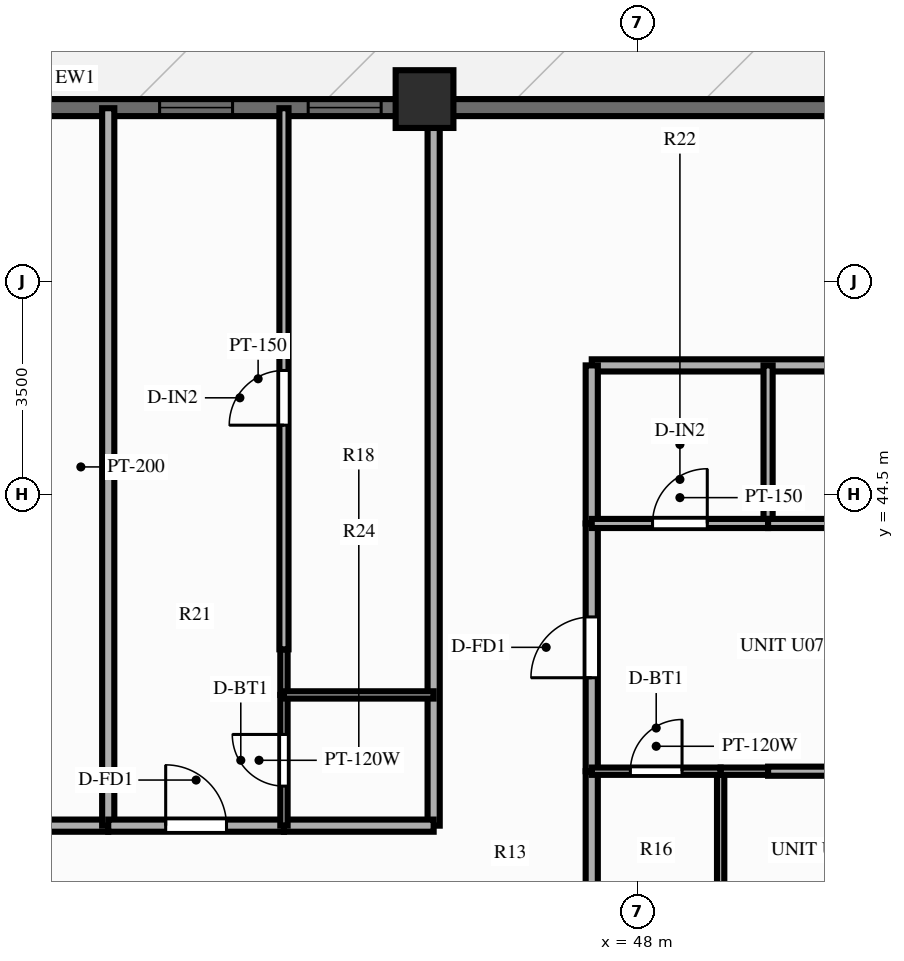
"""IFC4 building model, lengths in metres.
Left out: names, types, materials, properties, quantities, classifications, styles, units other than length and angle.
Written with IfcOpenShell. Run it as: python <this file> out.ifc"""

import sys

from ifc_helpers import new_model, si_unit, direction, frame, frame_2d, origin, origin_2d, place, context, subcontext, project, spatial, rectangle, extrude, source, transform, mapped, element, fill, save


model = new_model("IFC4")
c1 = context("Model", 3, precision=1e-05, world=origin(), true_north=direction((0.0, 1.0)))
c2 = subcontext(c1, "Body", "Model", "MODEL_VIEW")
j1 = project(units=[si_unit("LENGTHUNIT", "METRE"), si_unit("PLANEANGLEUNIT", "RADIAN")], contexts=[c1])
p1 = place(None, origin())
s1 = spatial("IfcSite", under=j1, at=p1, CompositionType="ELEMENT")
p2 = place(p1, origin())
s2 = spatial("IfcBuilding", under=s1, at=p2, CompositionType="ELEMENT")
p3 = place(p2, frame((0.0, 0.0, 98.85)))
s3 = spatial("IfcBuildingStorey", under=s2, at=p3, CompositionType="ELEMENT", Elevation=98.85)
m1 = source(origin(), c2, "Body", "SweptSolid", [
    extrude(rectangle(XDim=0.95, YDim=0.95, at=origin_2d()), origin(), (0.0, 0.0, 1.0), 3.0),
])
p4 = place(p3, frame((44.5, 51.0, 0.0), z_axis=(0.0, 0.0, 1.0), x_axis=(1.0, 0.0, 0.0)))
e1 = element("IfcColumn", 1, at=p4, inside=s3, PredefinedType="COLUMN", context=c2, shape_type="MappedRepresentation", body=[
    mapped(m1, transform((0.0, 0.0, 0.0), scale=1.0)),
])
p5 = place(p3, frame((16.2, 50.86, 0.0), z_axis=(0.0, 0.0, 1.0), x_axis=(1.0, 0.0, 0.0)))
e2 = element("IfcWall", 2, at=p5, inside=s3, PredefinedType="SOLIDWALL", context=c2, shape_type="SweptSolid", body=[
    extrude(rectangle(XDim=43.6, YDim=0.28, at=frame_2d((21.8, 0.0))), origin(), (0.0, 0.0, 1.0), 2.28),
])
p6 = place(p5, frame((7.1, 0.0, 0.0)))
e3 = element("IfcOpeningElement", 3, at=p6, cuts=e2, PredefinedType="OPENING", context=c2, shape_type="SweptSolid", body=[
    extrude(rectangle(XDim=1.1, YDim=2.15, at=frame_2d((0.55, 1.075))), frame((0.0, 0.152, 0.0), z_axis=(0.0, -1.0, 0.0), x_axis=(1.0, 0.0, 0.0)), (0.0, 0.0, 1.0), 0.304),
])
p7 = place(p5, frame((15.982, 0.0, 0.25)))
e4 = element("IfcOpeningElement", 4, at=p7, cuts=e2, PredefinedType="OPENING", context=c2, shape_type="SweptSolid", body=[
    extrude(rectangle(XDim=0.95, YDim=1.5, at=frame_2d((0.475, 0.75))), frame((0.0, 0.152, 0.0), z_axis=(0.0, -1.0, 0.0), x_axis=(1.0, 0.0, 0.0)), (0.0, 0.0, 1.0), 0.304),
])
p8 = place(p5, frame((18.033, 0.0, 0.25)))
e5 = element("IfcOpeningElement", 5, at=p8, cuts=e2, PredefinedType="OPENING", context=c2, shape_type="SweptSolid", body=[
    extrude(rectangle(XDim=1.2, YDim=1.5, at=frame_2d((0.6, 0.75))), frame((0.0, 0.152, 0.0), z_axis=(0.0, -1.0, 0.0), x_axis=(1.0, 0.0, 0.0)), (0.0, 0.0, 1.0), 0.304),
])
p9 = place(p5, frame((20.933, 0.0, 0.25)))
e6 = element("IfcOpeningElement", 6, at=p9, cuts=e2, PredefinedType="OPENING", context=c2, shape_type="SweptSolid", body=[
    extrude(rectangle(XDim=1.2, YDim=1.5, at=frame_2d((0.6, 0.75))), frame((0.0, 0.152, 0.0), z_axis=(0.0, -1.0, 0.0), x_axis=(1.0, 0.0, 0.0)), (0.0, 0.0, 1.0), 0.304),
])
p10 = place(p5, frame((23.943, 0.0, 0.25)))
e7 = element("IfcOpeningElement", 7, at=p10, cuts=e2, PredefinedType="OPENING", context=c2, shape_type="SweptSolid", body=[
    extrude(rectangle(XDim=1.2, YDim=1.5, at=frame_2d((0.6, 0.75))), frame((0.0, 0.152, 0.0), z_axis=(0.0, -1.0, 0.0), x_axis=(1.0, 0.0, 0.0)), (0.0, 0.0, 1.0), 0.304),
])
p11 = place(p5, frame((26.386, 0.0, 0.25)))
e8 = element("IfcOpeningElement", 8, at=p11, cuts=e2, PredefinedType="OPENING", context=c2, shape_type="SweptSolid", body=[
    extrude(rectangle(XDim=1.2, YDim=1.5, at=frame_2d((0.6, 0.75))), frame((0.0, 0.152, 0.0), z_axis=(0.0, -1.0, 0.0), x_axis=(1.0, 0.0, 0.0)), (0.0, 0.0, 1.0), 0.304),
])
p12 = place(p5, frame((35.35, 0.0, 0.25)))
e9 = element("IfcOpeningElement", 9, at=p12, cuts=e2, PredefinedType="OPENING", context=c2, shape_type="SweptSolid", body=[
    extrude(rectangle(XDim=1.2, YDim=1.5, at=frame_2d((0.6, 0.75))), frame((0.0, 0.152, 0.0), z_axis=(0.0, -1.0, 0.0), x_axis=(1.0, 0.0, 0.0)), (0.0, 0.0, 1.0), 0.304),
])
p13 = place(p3, frame((44.65, 39.05, 0.0), z_axis=(0.0, 0.0, 1.0), x_axis=(0.0, 1.0, 0.0)))
e10 = element("IfcWall", 10, at=p13, inside=s3, PredefinedType="PARTITIONING", context=c2, shape_type="SweptSolid", body=[
    extrude(rectangle(XDim=11.8, YDim=0.2, at=frame_2d((5.9, 0.0))), origin(), (0.0, 0.0, 1.0), 2.34),
])
p14 = place(p3, frame((36.167, 39.05, 0.0), z_axis=(0.0, 0.0, 1.0), x_axis=(1.0, 0.0, 0.0)))
e11 = element("IfcWall", 11, at=p14, inside=s3, PredefinedType="PARTITIONING", context=c2, shape_type="SweptSolid", body=[
    extrude(rectangle(XDim=3.131, YDim=0.2, at=frame_2d((1.565, 0.0))), origin(), (0.0, 0.0, 1.0), 2.79),
])
p15 = place(p14, frame((1.065, 0.0, 0.0)))
e12 = element("IfcOpeningElement", 12, at=p15, cuts=e11, PredefinedType="OPENING", context=c2, shape_type="SweptSolid", body=[
    extrude(rectangle(XDim=1.0, YDim=2.15, at=frame_2d((0.5, 1.075))), frame((0.0, 0.112, 0.0), z_axis=(0.0, -1.0, 0.0), x_axis=(1.0, 0.0, 0.0)), (0.0, 0.0, 1.0), 0.224),
])
p16 = place(p3, frame((39.298, 39.05, 0.0), z_axis=(0.0, 0.0, 1.0), x_axis=(0.0, 1.0, 0.0)))
e13 = element("IfcWall", 13, at=p16, inside=s3, PredefinedType="PARTITIONING", context=c2, shape_type="SweptSolid", body=[
    extrude(rectangle(XDim=11.8, YDim=0.2, at=frame_2d((5.9, 0.0))), origin(), (0.0, 0.0, 1.0), 2.79),
])
p17 = place(p3, frame((39.298, 39.05, 0.0), z_axis=(0.0, 0.0, 1.0), x_axis=(1.0, 0.0, 0.0)))
e14 = element("IfcWall", 14, at=p17, inside=s3, PredefinedType="PARTITIONING", context=c2, shape_type="SweptSolid", body=[
    extrude(rectangle(XDim=2.89, YDim=0.2, at=frame_2d((1.445, 0.0))), origin(), (0.0, 0.0, 1.0), 2.79),
])
p18 = place(p17, frame((0.945, 0.0, 0.0)))
e15 = element("IfcOpeningElement", 15, at=p18, cuts=e14, PredefinedType="OPENING", context=c2, shape_type="SweptSolid", body=[
    extrude(rectangle(XDim=1.0, YDim=2.15, at=frame_2d((0.5, 1.075))), frame((0.0, 0.112, 0.0), z_axis=(0.0, -1.0, 0.0), x_axis=(1.0, 0.0, 0.0)), (0.0, 0.0, 1.0), 0.224),
])
p19 = place(p3, frame((42.188, 39.05, 0.0), z_axis=(0.0, 0.0, 1.0), x_axis=(1.0, 0.0, 0.0)))
e16 = element("IfcWall", 16, at=p19, inside=s3, PredefinedType="PARTITIONING", context=c2, shape_type="SweptSolid", body=[
    extrude(rectangle(XDim=2.462, YDim=0.2, at=frame_2d((1.231, 0.0))), origin(), (0.0, 0.0, 1.0), 2.79),
])
p20 = place(p3, frame((42.188, 39.05, 0.0), z_axis=(0.0, 0.0, 1.0), x_axis=(0.0, 1.0, 0.0)))
e17 = element("IfcWall", 17, at=p20, inside=s3, PredefinedType="PARTITIONING", context=c2, shape_type="SweptSolid", body=[
    extrude(rectangle(XDim=2.15, YDim=0.12, at=frame_2d((1.075, 0.0))), origin(), (0.0, 0.0, 1.0), 2.79),
])
p21 = place(p20, frame((0.65, 0.0, 0.0)))
e18 = element("IfcOpeningElement", 18, at=p21, cuts=e17, PredefinedType="OPENING", context=c2, shape_type="SweptSolid", body=[
    extrude(rectangle(XDim=0.85, YDim=2.05, at=frame_2d((0.425, 1.025))), frame((0.0, 0.072, 0.0), z_axis=(0.0, -1.0, 0.0), x_axis=(1.0, 0.0, 0.0)), (0.0, 0.0, 1.0), 0.144),
])
p22 = place(p3, frame((42.188, 41.2, 0.0), z_axis=(0.0, 0.0, 1.0), x_axis=(0.0, 1.0, 0.0)))
e19 = element("IfcWall", 19, at=p22, inside=s3, PredefinedType="PARTITIONING", context=c2, shape_type="SweptSolid", body=[
    extrude(rectangle(XDim=0.75, YDim=0.12, at=frame_2d((0.375, 0.0))), origin(), (0.0, 0.0, 1.0), 2.79),
])
p23 = place(p3, frame((42.188, 41.2, 0.0), z_axis=(0.0, 0.0, 1.0), x_axis=(1.0, 0.0, 0.0)))
e20 = element("IfcWall", 20, at=p23, inside=s3, PredefinedType="PARTITIONING", context=c2, shape_type="SweptSolid", body=[
    extrude(rectangle(XDim=2.462, YDim=0.12, at=frame_2d((1.231, 0.0))), origin(), (0.0, 0.0, 1.0), 2.79),
])
p24 = place(p3, frame((42.188, 41.95, 0.0), z_axis=(0.0, 0.0, 1.0), x_axis=(0.0, 1.0, 0.0)))
e21 = element("IfcWall", 21, at=p24, inside=s3, PredefinedType="PARTITIONING", context=c2, shape_type="SweptSolid", body=[
    extrude(rectangle(XDim=8.9, YDim=0.15, at=frame_2d((4.45, 0.0))), origin(), (0.0, 0.0, 1.0), 2.79),
])
p25 = place(p24, frame((3.687, 0.0, 0.0)))
e22 = element("IfcOpeningElement", 22, at=p25, cuts=e21, PredefinedType="OPENING", context=c2, shape_type="SweptSolid", body=[
    extrude(rectangle(XDim=0.9, YDim=2.1, at=frame_2d((0.45, 1.05))), frame((0.0, 0.087, 0.0), z_axis=(0.0, -1.0, 0.0), x_axis=(1.0, 0.0, 0.0)), (0.0, 0.0, 1.0), 0.174),
])
p26 = place(p3, frame((47.25, 46.62, 0.0), z_axis=(0.0, 0.0, 1.0), x_axis=(1.0, 0.0, 0.0)))
e23 = element("IfcWall", 23, at=p26, inside=s3, PredefinedType="PARTITIONING", context=c2, shape_type="SweptSolid", body=[
    extrude(rectangle(XDim=16.6, YDim=0.2, at=frame_2d((8.3, 0.0))), origin(), (0.0, 0.0, 1.0), 2.79),
])
p27 = place(p3, frame((47.25, 37.35, 0.0), z_axis=(0.0, 0.0, 1.0), x_axis=(0.0, 1.0, 0.0)))
e24 = element("IfcWall", 24, at=p27, inside=s3, PredefinedType="PARTITIONING", context=c2, shape_type="SweptSolid", body=[
    extrude(rectangle(XDim=2.595, YDim=0.2, at=frame_2d((1.298, 0.0))), origin(), (0.0, 0.0, 1.0), 2.79),
])
p28 = place(p3, frame((47.25, 39.946, 0.0), z_axis=(0.0, 0.0, 1.0), x_axis=(0.0, 1.0, 0.0)))
e25 = element("IfcWall", 25, at=p28, inside=s3, PredefinedType="PARTITIONING", context=c2, shape_type="SweptSolid", body=[
    extrude(rectangle(XDim=4.074, YDim=0.2, at=frame_2d((2.037, 0.0))), origin(), (0.0, 0.0, 1.0), 2.79),
])
p29 = place(p28, frame((1.537, 0.0, 0.0)))
e26 = element("IfcOpeningElement", 26, at=p29, cuts=e25, PredefinedType="OPENING", context=c2, shape_type="SweptSolid", body=[
    extrude(rectangle(XDim=1.0, YDim=2.15, at=frame_2d((0.5, 1.075))), frame((0.0, 0.112, 0.0), z_axis=(0.0, -1.0, 0.0), x_axis=(1.0, 0.0, 0.0)), (0.0, 0.0, 1.0), 0.224),
])
p30 = place(p3, frame((47.25, 44.02, 0.0), z_axis=(0.0, 0.0, 1.0), x_axis=(0.0, 1.0, 0.0)))
e27 = element("IfcWall", 27, at=p30, inside=s3, PredefinedType="PARTITIONING", context=c2, shape_type="SweptSolid", body=[
    extrude(rectangle(XDim=2.6, YDim=0.2, at=frame_2d((1.3, 0.0))), origin(), (0.0, 0.0, 1.0), 2.79),
])
p31 = place(p3, frame((49.37, 37.35, 0.0), z_axis=(0.0, 0.0, 1.0), x_axis=(0.0, 1.0, 0.0)))
e28 = element("IfcWall", 28, at=p31, inside=s3, PredefinedType="PARTITIONING", context=c2, shape_type="SweptSolid", body=[
    extrude(rectangle(XDim=2.595, YDim=0.12, at=frame_2d((1.298, 0.0))), origin(), (0.0, 0.0, 1.0), 2.79),
])
p32 = place(p3, frame((50.15, 44.02, 0.0), z_axis=(0.0, 0.0, 1.0), x_axis=(0.0, 1.0, 0.0)))
e29 = element("IfcWall", 29, at=p32, inside=s3, PredefinedType="PARTITIONING", context=c2, shape_type="SweptSolid", body=[
    extrude(rectangle(XDim=2.6, YDim=0.15, at=frame_2d((1.3, 0.0))), origin(), (0.0, 0.0, 1.0), 2.79),
])
p33 = place(p3, frame((47.25, 39.946, 0.0), z_axis=(0.0, 0.0, 1.0), x_axis=(1.0, 0.0, 0.0)))
e30 = element("IfcWall", 30, at=p33, inside=s3, PredefinedType="PARTITIONING", context=c2, shape_type="SweptSolid", body=[
    extrude(rectangle(XDim=2.12, YDim=0.12, at=frame_2d((1.06, 0.0))), origin(), (0.0, 0.0, 1.0), 2.79),
])
p34 = place(p33, frame((0.635, 0.0, 0.0)))
e31 = element("IfcOpeningElement", 31, at=p34, cuts=e30, PredefinedType="OPENING", context=c2, shape_type="SweptSolid", body=[
    extrude(rectangle(XDim=0.85, YDim=2.05, at=frame_2d((0.425, 1.025))), frame((0.0, 0.072, 0.0), z_axis=(0.0, -1.0, 0.0), x_axis=(1.0, 0.0, 0.0)), (0.0, 0.0, 1.0), 0.144),
])
p35 = place(p3, frame((49.37, 39.946, 0.0), z_axis=(0.0, 0.0, 1.0), x_axis=(1.0, 0.0, 0.0)))
e32 = element("IfcWall", 32, at=p35, inside=s3, PredefinedType="PARTITIONING", context=c2, shape_type="SweptSolid", body=[
    extrude(rectangle(XDim=0.78, YDim=0.12, at=frame_2d((0.39, 0.0))), origin(), (0.0, 0.0, 1.0), 2.79),
])
p36 = place(p3, frame((50.15, 39.946, 0.0), z_axis=(0.0, 0.0, 1.0), x_axis=(1.0, 0.0, 0.0)))
e33 = element("IfcWall", 33, at=p36, inside=s3, PredefinedType="PARTITIONING", context=c2, shape_type="SweptSolid", body=[
    extrude(rectangle(XDim=13.7, YDim=0.15, at=frame_2d((6.85, 0.0))), origin(), (0.0, 0.0, 1.0), 2.79),
])
p37 = place(p36, frame((5.887, 0.0, 0.0)))
e34 = element("IfcOpeningElement", 34, at=p37, cuts=e33, PredefinedType="OPENING", context=c2, shape_type="SweptSolid", body=[
    extrude(rectangle(XDim=0.9, YDim=2.1, at=frame_2d((0.45, 1.05))), frame((0.0, 0.087, 0.0), z_axis=(0.0, -1.0, 0.0), x_axis=(1.0, 0.0, 0.0)), (0.0, 0.0, 1.0), 0.174),
])
p38 = place(p3, frame((47.25, 44.02, 0.0), z_axis=(0.0, 0.0, 1.0), x_axis=(1.0, 0.0, 0.0)))
e35 = element("IfcWall", 35, at=p38, inside=s3, PredefinedType="PARTITIONING", context=c2, shape_type="SweptSolid", body=[
    extrude(rectangle(XDim=2.9, YDim=0.15, at=frame_2d((1.45, 0.0))), origin(), (0.0, 0.0, 1.0), 2.79),
])
p39 = place(p38, frame((1.0, 0.0, 0.0)))
e36 = element("IfcOpeningElement", 36, at=p39, cuts=e35, PredefinedType="OPENING", context=c2, shape_type="SweptSolid", body=[
    extrude(rectangle(XDim=0.9, YDim=2.1, at=frame_2d((0.45, 1.05))), frame((0.0, 0.087, 0.0), z_axis=(0.0, -1.0, 0.0), x_axis=(1.0, 0.0, 0.0)), (0.0, 0.0, 1.0), 0.174),
])
p40 = place(p3, frame((50.15, 44.02, 0.0), z_axis=(0.0, 0.0, 1.0), x_axis=(1.0, 0.0, 0.0)))
e37 = element("IfcWall", 37, at=p40, inside=s3, PredefinedType="PARTITIONING", context=c2, shape_type="SweptSolid", body=[
    extrude(rectangle(XDim=13.7, YDim=0.15, at=frame_2d((6.85, 0.0))), origin(), (0.0, 0.0, 1.0), 2.79),
])
p41 = place(p40, frame((5.887, 0.0, 0.0)))
e38 = element("IfcOpeningElement", 38, at=p41, cuts=e37, PredefinedType="OPENING", context=c2, shape_type="SweptSolid", body=[
    extrude(rectangle(XDim=0.9, YDim=2.1, at=frame_2d((0.45, 1.05))), frame((0.0, 0.087, 0.0), z_axis=(0.0, -1.0, 0.0), x_axis=(1.0, 0.0, 0.0)), (0.0, 0.0, 1.0), 0.174),
])
m2 = source(origin(), c2, "Body", "SweptSolid", [
    extrude(rectangle(XDim=1.2, YDim=1.5, at=frame_2d((0.6, 0.75))), frame((0.0, 0.03, 0.0), z_axis=(0.0, -1.0, 0.0), x_axis=(1.0, 0.0, 0.0)), (0.0, 0.0, 1.0), 0.06),
])
p42 = place(p10, origin())
e39 = element("IfcWindow", 39, at=p42, inside=s3, PartitioningType="SINGLE_PANEL", PredefinedType="WINDOW", context=c2, shape_type="MappedRepresentation", body=[
    mapped(m2, transform((0.0, 0.0, 0.0), scale=1.0)),
])
fill(e7, e39)
p43 = place(p11, origin())
e40 = element("IfcWindow", 40, at=p43, inside=s3, PartitioningType="SINGLE_PANEL", PredefinedType="WINDOW", context=c2, shape_type="MappedRepresentation", body=[
    mapped(m2, transform((0.0, 0.0, 0.0), scale=1.0)),
])
fill(e8, e40)
m3 = source(origin(), c2, "Body", "SweptSolid", [
    extrude(rectangle(XDim=1.0, YDim=2.15, at=frame_2d((0.5, 1.075))), frame((0.0, 0.025, 0.0), z_axis=(0.0, -1.0, 0.0), x_axis=(1.0, 0.0, 0.0)), (0.0, 0.0, 1.0), 0.05),
])
p44 = place(p18, origin())
e41 = element("IfcDoor", 41, at=p44, inside=s3, OperationType="SINGLE_SWING_LEFT", PredefinedType="DOOR", context=c2, shape_type="MappedRepresentation", body=[
    mapped(m3, transform((0.0, 0.0, 0.0), scale=1.0)),
])
fill(e15, e41)
m4 = source(origin(), c2, "Body", "SweptSolid", [
    extrude(rectangle(XDim=0.85, YDim=2.05, at=frame_2d((0.425, 1.025))), frame((0.0, 0.025, 0.0), z_axis=(0.0, -1.0, 0.0), x_axis=(1.0, 0.0, 0.0)), (0.0, 0.0, 1.0), 0.05),
])
p45 = place(p21, origin())
e42 = element("IfcDoor", 42, at=p45, inside=s3, OperationType="SINGLE_SWING_RIGHT", PredefinedType="DOOR", context=c2, shape_type="MappedRepresentation", body=[
    mapped(m4, transform((0.0, 0.0, 0.0), scale=1.0)),
])
fill(e18, e42)
m5 = source(origin(), c2, "Body", "SweptSolid", [
    extrude(rectangle(XDim=0.9, YDim=2.1, at=frame_2d((0.45, 1.05))), frame((0.0, 0.025, 0.0), z_axis=(0.0, -1.0, 0.0), x_axis=(1.0, 0.0, 0.0)), (0.0, 0.0, 1.0), 0.05),
])
p46 = place(p25, origin())
e43 = element("IfcDoor", 43, at=p46, inside=s3, OperationType="SINGLE_SWING_LEFT", PredefinedType="DOOR", context=c2, shape_type="MappedRepresentation", body=[
    mapped(m5, transform((0.0, 0.0, 0.0), scale=1.0)),
])
fill(e22, e43)
p47 = place(p29, origin())
e44 = element("IfcDoor", 44, at=p47, inside=s3, OperationType="SINGLE_SWING_LEFT", PredefinedType="DOOR", context=c2, shape_type="MappedRepresentation", body=[
    mapped(m3, transform((0.0, 0.0, 0.0), scale=1.0)),
])
fill(e26, e44)
p48 = place(p34, origin())
e45 = element("IfcDoor", 45, at=p48, inside=s3, OperationType="SINGLE_SWING_RIGHT", PredefinedType="DOOR", context=c2, shape_type="MappedRepresentation", body=[
    mapped(m4, transform((0.0, 0.0, 0.0), scale=1.0)),
])
fill(e31, e45)
p49 = place(p39, origin())
e46 = element("IfcDoor", 46, at=p49, inside=s3, OperationType="SINGLE_SWING_RIGHT", PredefinedType="DOOR", context=c2, shape_type="MappedRepresentation", body=[
    mapped(m5, transform((0.0, 0.0, 0.0), scale=1.0)),
])
fill(e36, e46)
save(model, sys.argv[1])
